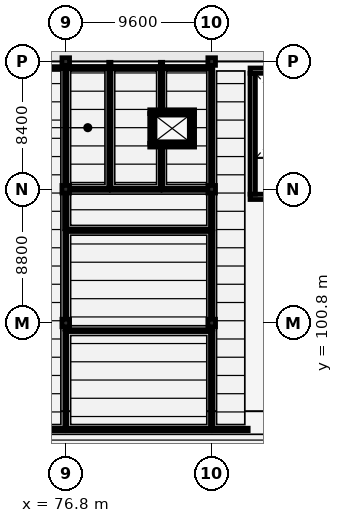
"""IFC4 building model, lengths in metres.
Left out: names, types, materials, properties, quantities, classifications, styles, units other than length and angle.
Written with IfcOpenShell. Run it as: python <this file> out.ifc"""

import sys

from ifc_helpers import new_model, si_unit, direction, frame, frame_2d, origin, origin_2d, place, context, subcontext, project, spatial, rectangle, extrude, element, fill, save


model = new_model("IFC4")
c1 = context("Model", 3, precision=1e-05, world=origin(), true_north=direction((0.0, 1.0)))
c2 = subcontext(c1, "Body", "Model", "MODEL_VIEW")
j1 = project(units=[si_unit("LENGTHUNIT", "METRE"), si_unit("PLANEANGLEUNIT", "RADIAN")], contexts=[c1])
p1 = place(None, origin())
s1 = spatial("IfcSite", under=j1, at=p1, CompositionType="ELEMENT")
p2 = place(p1, origin())
s2 = spatial("IfcBuilding", under=s1, at=p2, CompositionType="ELEMENT")
p3 = place(p2, frame((0.0, 0.0, 14.1)))
s3 = spatial("IfcBuildingStorey", under=s2, at=p3, CompositionType="ELEMENT", Elevation=14.1)
for number, where, z_axis, x_axis in (
    (1, (76.8, 100.8, 0.0), (0.0, 0.0, 1.0), (1.0, 0.0, 0.0)),
    (2, (76.8, 109.6, 0.0), (0.0, 0.0, 1.0), (1.0, 0.0, 0.0)),
):
    element("IfcColumn", number, at=place(p3, frame(where, z_axis=z_axis, x_axis=x_axis)), inside=s3, PredefinedType="COLUMN", context=c2, shape_type="SweptSolid", body=[
        extrude(rectangle(XDim=0.5, YDim=0.5, at=origin_2d()), origin(), (0.0, 0.0, 1.0), 4.5),
    ])
p4 = place(p3, frame((76.8, 118.0, 0.0), z_axis=(0.0, 0.0, 1.0), x_axis=(1.0, 0.0, 0.0)))
e3 = element("IfcColumn", 3, at=p4, inside=s3, PredefinedType="COLUMN", context=c2, shape_type="SweptSolid", body=[
    extrude(rectangle(XDim=0.5, YDim=0.5, at=origin_2d()), origin(), (0.0, 0.0, 1.0), 3.851),
])
p5 = place(p3, frame((86.4, 100.8, 0.0), z_axis=(0.0, 0.0, 1.0), x_axis=(1.0, 0.0, 0.0)))
e4 = element("IfcColumn", 4, at=p5, inside=s3, PredefinedType="COLUMN", context=c2, shape_type="SweptSolid", body=[
    extrude(rectangle(XDim=0.5, YDim=0.5, at=origin_2d()), origin(), (0.0, 0.0, 1.0), 4.5),
])
p6 = place(p3, frame((86.4, 109.6, 0.0), z_axis=(0.0, 0.0, 1.0), x_axis=(1.0, 0.0, 0.0)))
e5 = element("IfcColumn", 5, at=p6, inside=s3, PredefinedType="COLUMN", context=c2, shape_type="SweptSolid", body=[
    extrude(rectangle(XDim=0.5, YDim=0.5, at=origin_2d()), origin(), (0.0, 0.0, 1.0), 4.326),
])
p7 = place(p3, frame((86.4, 118.0, 0.0), z_axis=(0.0, 0.0, 1.0), x_axis=(1.0, 0.0, 0.0)))
e6 = element("IfcColumn", 6, at=p7, inside=s3, PredefinedType="COLUMN", context=c2, shape_type="SweptSolid", body=[
    extrude(rectangle(XDim=0.5, YDim=0.5, at=origin_2d()), origin(), (0.0, 0.0, 1.0), 3.675),
])
for number, where, z_axis, x_axis in (
    (7, (94.575, 109.1, 0.0), (0.0, 0.0, 1.0), (-1.0, 0.0, 0.0)),
    (8, (88.925, 117.4, 0.0), (0.0, 0.0, 1.0), (1.0, 0.0, 0.0)),
):
    element("IfcWall", number, at=place(p3, frame(where, z_axis=z_axis, x_axis=x_axis)), inside=s3, PredefinedType="SHEAR", context=c2, shape_type="SweptSolid", body=[
        extrude(rectangle(XDim=5.65, YDim=0.35, at=frame_2d((2.825, 0.0))), origin(), (0.0, 0.0, 1.0), 3.65),
    ])
p8 = place(p3, frame((89.1, 109.275, 0.0), z_axis=(0.0, 0.0, 1.0), x_axis=(0.0, 1.0, 0.0)))
e9 = element("IfcWall", 9, at=p8, inside=s3, PredefinedType="SHEAR", context=c2, shape_type="SweptSolid", body=[
    extrude(rectangle(XDim=7.95, YDim=0.35, at=frame_2d((3.975, 0.0))), origin(), (0.0, 0.0, 1.0), 3.65),
])
p9 = place(p8, frame((0.22, 0.0, 0.0)))
e10 = element("IfcOpeningElement", 10, at=p9, cuts=e9, PredefinedType="OPENING", context=c2, shape_type="SweptSolid", body=[
    extrude(rectangle(XDim=2.05, YDim=2.15, at=frame_2d((1.025, 1.075))), frame((0.0, 0.185, 0.0), z_axis=(0.0, -1.0, 0.0), x_axis=(1.0, 0.0, 0.0)), (0.0, 0.0, 1.0), 0.37),
])
p10 = place(p3, frame((85.275, 112.5, 0.0), z_axis=(0.0, 0.0, 1.0), x_axis=(-1.0, 0.0, 0.0)))
e11 = element("IfcWall", 11, at=p10, inside=s3, PredefinedType="SOLIDWALL", context=c2, shape_type="SweptSolid", body=[
    extrude(rectangle(XDim=2.95, YDim=0.25, at=frame_2d((1.475, 0.0))), origin(), (0.0, 0.0, 1.0), 3.65),
])
p11 = place(p10, frame((0.925, 0.0, 0.0)))
e12 = element("IfcOpeningElement", 12, at=p11, cuts=e11, PredefinedType="OPENING", context=c2, shape_type="SweptSolid", body=[
    extrude(rectangle(XDim=1.1, YDim=2.15, at=frame_2d((0.55, 1.075))), frame((0.0, 0.135, 0.0), z_axis=(0.0, -1.0, 0.0), x_axis=(1.0, 0.0, 0.0)), (0.0, 0.0, 1.0), 0.27),
])
p12 = place(p3, frame((82.325, 114.7, 0.0), z_axis=(0.0, 0.0, 1.0), x_axis=(1.0, 0.0, 0.0)))
e13 = element("IfcWall", 13, at=p12, inside=s3, PredefinedType="SOLIDWALL", context=c2, shape_type="SweptSolid", body=[
    extrude(rectangle(XDim=2.95, YDim=0.25, at=frame_2d((1.475, 0.0))), origin(), (0.0, 0.0, 1.0), 3.65),
])
for number, where, z_axis, x_axis in (
    (14, (82.45, 112.625, 0.0), (0.0, 0.0, 1.0), (0.0, 1.0, 0.0)),
    (15, (85.15, 114.575, 0.0), (0.0, 0.0, 1.0), (0.0, -1.0, 0.0)),
):
    element("IfcWall", number, at=place(p3, frame(where, z_axis=z_axis, x_axis=x_axis)), inside=s3, PredefinedType="SOLIDWALL", context=c2, shape_type="SweptSolid", body=[
        extrude(rectangle(XDim=1.95, YDim=0.25, at=frame_2d((0.975, 0.0))), origin(), (0.0, 0.0, 1.0), 3.65),
    ])
p13 = place(p3, frame((86.5, 93.8, 0.0), z_axis=(0.0, 0.0, 1.0), x_axis=(1.0, 0.0, 0.0)))
e16 = element("IfcWall", 16, at=p13, inside=s3, PredefinedType="PARTITIONING", context=c2, shape_type="SweptSolid", body=[
    extrude(rectangle(XDim=2.3, YDim=0.16, at=frame_2d((1.15, 0.0))), origin(), (0.0, 0.0, 1.0), 3.1),
])
p14 = place(p13, frame((0.25, 0.0, 0.0)))
e17 = element("IfcOpeningElement", 17, at=p14, cuts=e16, PredefinedType="OPENING", context=c2, shape_type="SweptSolid", body=[
    extrude(rectangle(XDim=1.8, YDim=2.15, at=frame_2d((0.9, 1.075))), frame((0.0, 0.09, 0.0), z_axis=(0.0, -1.0, 0.0), x_axis=(1.0, 0.0, 0.0)), (0.0, 0.0, 1.0), 0.18),
])
p15 = place(p3, frame((48.05, 93.8, 0.0), z_axis=(0.0, 0.0, 1.0), x_axis=(1.0, 0.0, 0.0)))
e18 = element("IfcWall", 18, at=p15, inside=s3, PredefinedType="PARTITIONING", context=c2, shape_type="SweptSolid", body=[
    extrude(rectangle(XDim=28.65, YDim=0.16, at=frame_2d((14.325, 0.0))), origin(), (0.0, 0.0, 1.0), 3.1),
])
p16 = place(p15, frame((13.85, 0.0, 0.0)))
e19 = element("IfcOpeningElement", 19, at=p16, cuts=e18, PredefinedType="OPENING", context=c2, shape_type="SweptSolid", body=[
    extrude(rectangle(XDim=0.95, YDim=2.15, at=frame_2d((0.475, 1.075))), frame((0.0, 0.09, 0.0), z_axis=(0.0, -1.0, 0.0), x_axis=(1.0, 0.0, 0.0)), (0.0, 0.0, 1.0), 0.18),
])
p17 = place(p3, frame((76.9, 93.8, 0.0), z_axis=(0.0, 0.0, 1.0), x_axis=(1.0, 0.0, 0.0)))
e20 = element("IfcWall", 20, at=p17, inside=s3, PredefinedType="PARTITIONING", context=c2, shape_type="SweptSolid", body=[
    extrude(rectangle(XDim=9.4, YDim=0.16, at=frame_2d((4.7, 0.0))), origin(), (0.0, 0.0, 1.0), 3.1),
])
p18 = place(p17, frame((4.18, 0.0, 0.0)))
e21 = element("IfcOpeningElement", 21, at=p18, cuts=e20, PredefinedType="OPENING", context=c2, shape_type="SweptSolid", body=[
    extrude(rectangle(XDim=1.04, YDim=2.18, at=frame_2d((0.52, 1.09))), frame((0.0, 0.09, 0.0), z_axis=(0.0, -1.0, 0.0), x_axis=(1.0, 0.0, 0.0)), (0.0, 0.0, 1.0), 0.18),
])
p19 = place(p3, frame((86.4, 100.4, 0.0), z_axis=(0.0, 0.0, 1.0), x_axis=(0.0, 1.0, 0.0)))
e22 = element("IfcWall", 22, at=p19, inside=s3, PredefinedType="PARTITIONING", context=c2, shape_type="SweptSolid", body=[
    extrude(rectangle(XDim=6.4, YDim=0.16, at=frame_2d((3.2, 0.0))), origin(), (0.0, 0.0, 1.0), 3.1),
])
p20 = place(p19, frame((2.68, 0.0, 0.0)))
e23 = element("IfcOpeningElement", 23, at=p20, cuts=e22, PredefinedType="OPENING", context=c2, shape_type="SweptSolid", body=[
    extrude(rectangle(XDim=1.04, YDim=2.18, at=frame_2d((0.52, 1.09))), frame((0.0, 0.09, 0.0), z_axis=(0.0, -1.0, 0.0), x_axis=(1.0, 0.0, 0.0)), (0.0, 0.0, 1.0), 0.18),
])
p21 = place(p3, frame((86.4, 107.0, 0.0), z_axis=(0.0, 0.0, 1.0), x_axis=(0.0, 1.0, 0.0)))
e24 = element("IfcWall", 24, at=p21, inside=s3, PredefinedType="PARTITIONING", context=c2, shape_type="SweptSolid", body=[
    extrude(rectangle(XDim=2.5, YDim=0.16, at=frame_2d((1.25, 0.0))), origin(), (0.0, 0.0, 1.0), 3.1),
])
p22 = place(p21, frame((0.22, 0.0, 0.0)))
e25 = element("IfcOpeningElement", 25, at=p22, cuts=e24, PredefinedType="OPENING", context=c2, shape_type="SweptSolid", body=[
    extrude(rectangle(XDim=1.8, YDim=2.15, at=frame_2d((0.9, 1.075))), frame((0.0, 0.09, 0.0), z_axis=(0.0, -1.0, 0.0), x_axis=(1.0, 0.0, 0.0)), (0.0, 0.0, 1.0), 0.18),
])
p23 = place(p3, frame((86.4, 109.7, 0.0), z_axis=(0.0, 0.0, 1.0), x_axis=(0.0, 1.0, 0.0)))
e26 = element("IfcWall", 26, at=p23, inside=s3, PredefinedType="PARTITIONING", context=c2, shape_type="SweptSolid", body=[
    extrude(rectangle(XDim=8.25, YDim=0.15, at=frame_2d((4.125, 0.0))), origin(), (0.0, 0.0, 1.0), 2.816),
])
p24 = place(p23, frame((3.675, 0.0, 0.0)))
e27 = element("IfcOpeningElement", 27, at=p24, cuts=e26, PredefinedType="OPENING", context=c2, shape_type="SweptSolid", body=[
    extrude(rectangle(XDim=0.9, YDim=2.15, at=frame_2d((0.45, 1.075))), frame((0.0, 0.085, 0.0), z_axis=(0.0, -1.0, 0.0), x_axis=(1.0, 0.0, 0.0)), (0.0, 0.0, 1.0), 0.17),
])
p25 = place(p3, frame((86.4, 93.9, 0.0), z_axis=(0.0, 0.0, 1.0), x_axis=(0.0, 1.0, 0.0)))
e28 = element("IfcWall", 28, at=p25, inside=s3, PredefinedType="PARTITIONING", context=c2, shape_type="SweptSolid", body=[
    extrude(rectangle(XDim=6.3, YDim=0.16, at=frame_2d((3.15, 0.0))), origin(), (0.0, 0.0, 1.0), 3.1),
])
p26 = place(p25, frame((2.63, 0.0, 0.0)))
e29 = element("IfcOpeningElement", 29, at=p26, cuts=e28, PredefinedType="OPENING", context=c2, shape_type="SweptSolid", body=[
    extrude(rectangle(XDim=1.04, YDim=2.18, at=frame_2d((0.52, 1.09))), frame((0.0, 0.09, 0.0), z_axis=(0.0, -1.0, 0.0), x_axis=(1.0, 0.0, 0.0)), (0.0, 0.0, 1.0), 0.18),
])
p27 = place(p3, frame((76.8, 100.4, 0.0), z_axis=(0.0, 0.0, 1.0), x_axis=(0.0, 1.0, 0.0)))
e30 = element("IfcWall", 30, at=p27, inside=s3, PredefinedType="PARTITIONING", context=c2, shape_type="SweptSolid", body=[
    extrude(rectangle(XDim=6.4, YDim=0.125, at=frame_2d((3.2, 0.0))), origin(), (0.0, 0.0, 1.0), 3.1),
])
p28 = place(p3, frame((76.8, 107.0, 0.0), z_axis=(0.0, 0.0, 1.0), x_axis=(0.0, 1.0, 0.0)))
e31 = element("IfcWall", 31, at=p28, inside=s3, PredefinedType="PARTITIONING", context=c2, shape_type="SweptSolid", body=[
    extrude(rectangle(XDim=2.5, YDim=0.16, at=frame_2d((1.25, 0.0))), origin(), (0.0, 0.0, 1.0), 3.1),
])
p29 = place(p28, frame((0.443, 0.0, 0.0)))
e32 = element("IfcOpeningElement", 32, at=p29, cuts=e31, PredefinedType="OPENING", context=c2, shape_type="SweptSolid", body=[
    extrude(rectangle(XDim=0.95, YDim=2.15, at=frame_2d((0.475, 1.075))), frame((0.0, 0.09, 0.0), z_axis=(0.0, -1.0, 0.0), x_axis=(1.0, 0.0, 0.0)), (0.0, 0.0, 1.0), 0.18),
])
p30 = place(p3, frame((76.8, 109.7, 0.0), z_axis=(0.0, 0.0, 1.0), x_axis=(0.0, 1.0, 0.0)))
e33 = element("IfcWall", 33, at=p30, inside=s3, PredefinedType="PARTITIONING", context=c2, shape_type="SweptSolid", body=[
    extrude(rectangle(XDim=8.25, YDim=0.15, at=frame_2d((4.125, 0.0))), origin(), (0.0, 0.0, 1.0), 2.992),
])
p31 = place(p3, frame((76.8, 93.9, 0.0), z_axis=(0.0, 0.0, 1.0), x_axis=(0.0, 1.0, 0.0)))
e34 = element("IfcWall", 34, at=p31, inside=s3, PredefinedType="PARTITIONING", context=c2, shape_type="SweptSolid", body=[
    extrude(rectangle(XDim=6.3, YDim=0.125, at=frame_2d((3.15, 0.0))), origin(), (0.0, 0.0, 1.0), 3.1),
])
p32 = place(p3, frame((76.9, 106.9, 0.0), z_axis=(0.0, 0.0, 1.0), x_axis=(1.0, 0.0, 0.0)))
e35 = element("IfcWall", 35, at=p32, inside=s3, PredefinedType="PARTITIONING", context=c2, shape_type="SweptSolid", body=[
    extrude(rectangle(XDim=9.4, YDim=0.16, at=frame_2d((4.7, 0.0))), origin(), (0.0, 0.0, 1.0), 3.1),
])
p33 = place(p32, frame((4.18, 0.0, 0.0)))
e36 = element("IfcOpeningElement", 36, at=p33, cuts=e35, PredefinedType="OPENING", context=c2, shape_type="SweptSolid", body=[
    extrude(rectangle(XDim=1.04, YDim=2.18, at=frame_2d((0.52, 1.09))), frame((0.0, 0.09, 0.0), z_axis=(0.0, -1.0, 0.0), x_axis=(1.0, 0.0, 0.0)), (0.0, 0.0, 1.0), 0.18),
])
p34 = place(p3, frame((76.9, 100.3, 0.0), z_axis=(0.0, 0.0, 1.0), x_axis=(1.0, 0.0, 0.0)))
e37 = element("IfcWall", 37, at=p34, inside=s3, PredefinedType="PARTITIONING", context=c2, shape_type="SweptSolid", body=[
    extrude(rectangle(XDim=9.4, YDim=0.125, at=frame_2d((4.7, 0.0))), origin(), (0.0, 0.0, 1.0), 3.1),
])
p35 = place(p3, frame((76.9, 109.6, 0.0), z_axis=(0.0, 0.0, 1.0), x_axis=(1.0, 0.0, 0.0)))
e38 = element("IfcWall", 38, at=p35, inside=s3, PredefinedType="PARTITIONING", context=c2, shape_type="SweptSolid", body=[
    extrude(rectangle(XDim=2.7, YDim=0.15, at=frame_2d((1.35, 0.0))), origin(), (0.0, 0.0, 1.0), 3.1),
])
p36 = place(p35, frame((1.132, 0.0, 0.0)))
e39 = element("IfcOpeningElement", 39, at=p36, cuts=e38, PredefinedType="OPENING", context=c2, shape_type="SweptSolid", body=[
    extrude(rectangle(XDim=0.95, YDim=2.15, at=frame_2d((0.475, 1.075))), frame((0.0, 0.085, 0.0), z_axis=(0.0, -1.0, 0.0), x_axis=(1.0, 0.0, 0.0)), (0.0, 0.0, 1.0), 0.17),
])
p37 = place(p3, frame((79.8, 109.6, 0.0), z_axis=(0.0, 0.0, 1.0), x_axis=(1.0, 0.0, 0.0)))
e40 = element("IfcWall", 40, at=p37, inside=s3, PredefinedType="PARTITIONING", context=c2, shape_type="SweptSolid", body=[
    extrude(rectangle(XDim=3.2, YDim=0.15, at=frame_2d((1.6, 0.0))), origin(), (0.0, 0.0, 1.0), 3.1),
])
p38 = place(p37, frame((1.15, 0.0, 0.0)))
e41 = element("IfcOpeningElement", 41, at=p38, cuts=e40, PredefinedType="OPENING", context=c2, shape_type="SweptSolid", body=[
    extrude(rectangle(XDim=0.9, YDim=2.15, at=frame_2d((0.45, 1.075))), frame((0.0, 0.085, 0.0), z_axis=(0.0, -1.0, 0.0), x_axis=(1.0, 0.0, 0.0)), (0.0, 0.0, 1.0), 0.17),
])
p39 = place(p3, frame((83.2, 109.6, 0.0), z_axis=(0.0, 0.0, 1.0), x_axis=(1.0, 0.0, 0.0)))
e42 = element("IfcWall", 42, at=p39, inside=s3, PredefinedType="PARTITIONING", context=c2, shape_type="SweptSolid", body=[
    extrude(rectangle(XDim=3.1, YDim=0.15, at=frame_2d((1.55, 0.0))), origin(), (0.0, 0.0, 1.0), 3.1),
])
p40 = place(p39, frame((1.1, 0.0, 0.0)))
e43 = element("IfcOpeningElement", 43, at=p40, cuts=e42, PredefinedType="OPENING", context=c2, shape_type="SweptSolid", body=[
    extrude(rectangle(XDim=0.9, YDim=2.15, at=frame_2d((0.45, 1.075))), frame((0.0, 0.085, 0.0), z_axis=(0.0, -1.0, 0.0), x_axis=(1.0, 0.0, 0.0)), (0.0, 0.0, 1.0), 0.17),
])
for number, where, z_axis, x_axis in (
    (44, (79.7, 109.7, 0.0), (0.0, 0.0, 1.0), (0.0, 1.0, 0.0)),
    (45, (83.1, 109.7, 0.0), (0.0, 0.0, 1.0), (0.0, 1.0, 0.0)),
):
    element("IfcWall", number, at=place(p3, frame(where, z_axis=z_axis, x_axis=x_axis)), inside=s3, PredefinedType="PARTITIONING", context=c2, shape_type="SweptSolid", body=[
        extrude(rectangle(XDim=8.25, YDim=0.15, at=frame_2d((4.125, 0.0))), origin(), (0.0, 0.0, 1.0), 3.1),
    ])
p41 = place(p3, frame((48.05, 117.6, 0.0), z_axis=(0.0, 0.0, 1.0), x_axis=(1.0, 0.0, 0.0)))
e46 = element("IfcWall", 46, at=p41, inside=s3, PredefinedType="PARTITIONING", context=c2, shape_type="SweptSolid", body=[
    extrude(rectangle(XDim=28.51, YDim=0.125, at=frame_2d((14.255, 0.0))), origin(), (0.0, 0.0, 1.0), 3.1),
])
p42 = place(p3, frame((77.04, 117.6, 0.0), z_axis=(0.0, 0.0, 1.0), x_axis=(1.0, 0.0, 0.0)))
e47 = element("IfcWall", 47, at=p42, inside=s3, PredefinedType="PARTITIONING", context=c2, shape_type="SweptSolid", body=[
    extrude(rectangle(XDim=2.42, YDim=0.15, at=frame_2d((1.21, 0.0))), origin(), (0.0, 0.0, 1.0), 3.1),
])
p43 = place(p3, frame((79.94, 117.6, 0.0), z_axis=(0.0, 0.0, 1.0), x_axis=(1.0, 0.0, 0.0)))
e48 = element("IfcWall", 48, at=p43, inside=s3, PredefinedType="PARTITIONING", context=c2, shape_type="SweptSolid", body=[
    extrude(rectangle(XDim=2.92, YDim=0.15, at=frame_2d((1.46, 0.0))), origin(), (0.0, 0.0, 1.0), 3.1),
])
p44 = place(p3, frame((83.34, 117.6, 0.0), z_axis=(0.0, 0.0, 1.0), x_axis=(1.0, 0.0, 0.0)))
e49 = element("IfcWall", 49, at=p44, inside=s3, PredefinedType="PARTITIONING", context=c2, shape_type="SweptSolid", body=[
    extrude(rectangle(XDim=2.82, YDim=0.15, at=frame_2d((1.41, 0.0))), origin(), (0.0, 0.0, 1.0), 3.1),
])
p45 = place(p9, origin())
e50 = element("IfcDoor", 50, at=p45, inside=s3, OperationType="DOUBLE_DOOR_SINGLE_SWING", PredefinedType="DOOR", context=c2, shape_type="SweptSolid", body=[
    extrude(rectangle(XDim=2.05, YDim=2.15, at=frame_2d((1.025, 1.075))), frame((0.0, 0.025, 0.0), z_axis=(0.0, -1.0, 0.0), x_axis=(1.0, 0.0, 0.0)), (0.0, 0.0, 1.0), 0.05),
])
fill(e10, e50)
p46 = place(p11, origin())
e51 = element("IfcDoor", 51, at=p46, inside=s3, OperationType="DOUBLE_DOOR_SLIDING", PredefinedType="DOOR", context=c2, shape_type="SweptSolid", body=[
    extrude(rectangle(XDim=1.1, YDim=2.15, at=frame_2d((0.55, 1.075))), frame((0.0, 0.025, 0.0), z_axis=(0.0, -1.0, 0.0), x_axis=(1.0, 0.0, 0.0)), (0.0, 0.0, 1.0), 0.05),
])
fill(e12, e51)
p47 = place(p14, origin())
e52 = element("IfcDoor", 52, at=p47, inside=s3, OperationType="DOUBLE_DOOR_SINGLE_SWING", PredefinedType="DOOR", context=c2, shape_type="SweptSolid", body=[
    extrude(rectangle(XDim=1.8, YDim=2.15, at=frame_2d((0.9, 1.075))), frame((0.0, 0.025, 0.0), z_axis=(0.0, -1.0, 0.0), x_axis=(1.0, 0.0, 0.0)), (0.0, 0.0, 1.0), 0.05),
])
fill(e17, e52)
p48 = place(p18, origin())
e53 = element("IfcDoor", 53, at=p48, inside=s3, OperationType="SINGLE_SWING_LEFT", PredefinedType="DOOR", context=c2, shape_type="SweptSolid", body=[
    extrude(rectangle(XDim=1.04, YDim=2.18, at=frame_2d((0.52, 1.09))), frame((0.0, 0.025, 0.0), z_axis=(0.0, -1.0, 0.0), x_axis=(1.0, 0.0, 0.0)), (0.0, 0.0, 1.0), 0.05),
])
fill(e21, e53)
p49 = place(p20, origin())
e54 = element("IfcDoor", 54, at=p49, inside=s3, OperationType="SINGLE_SWING_RIGHT", PredefinedType="DOOR", context=c2, shape_type="SweptSolid", body=[
    extrude(rectangle(XDim=1.04, YDim=2.18, at=frame_2d((0.52, 1.09))), frame((0.0, 0.025, 0.0), z_axis=(0.0, -1.0, 0.0), x_axis=(1.0, 0.0, 0.0)), (0.0, 0.0, 1.0), 0.05),
])
fill(e23, e54)
p50 = place(p22, origin())
e55 = element("IfcDoor", 55, at=p50, inside=s3, OperationType="DOUBLE_DOOR_SINGLE_SWING", PredefinedType="DOOR", context=c2, shape_type="SweptSolid", body=[
    extrude(rectangle(XDim=1.8, YDim=2.15, at=frame_2d((0.9, 1.075))), frame((0.0, 0.025, 0.0), z_axis=(0.0, -1.0, 0.0), x_axis=(1.0, 0.0, 0.0)), (0.0, 0.0, 1.0), 0.05),
])
fill(e25, e55)
p51 = place(p24, origin())
e56 = element("IfcDoor", 56, at=p51, inside=s3, OperationType="SINGLE_SWING_RIGHT", PredefinedType="DOOR", context=c2, shape_type="SweptSolid", body=[
    extrude(rectangle(XDim=0.9, YDim=2.15, at=frame_2d((0.45, 1.075))), frame((0.0, 0.025, 0.0), z_axis=(0.0, -1.0, 0.0), x_axis=(1.0, 0.0, 0.0)), (0.0, 0.0, 1.0), 0.05),
])
fill(e27, e56)
p52 = place(p26, origin())
e57 = element("IfcDoor", 57, at=p52, inside=s3, OperationType="SINGLE_SWING_LEFT", PredefinedType="DOOR", context=c2, shape_type="SweptSolid", body=[
    extrude(rectangle(XDim=1.04, YDim=2.18, at=frame_2d((0.52, 1.09))), frame((0.0, 0.025, 0.0), z_axis=(0.0, -1.0, 0.0), x_axis=(1.0, 0.0, 0.0)), (0.0, 0.0, 1.0), 0.05),
])
fill(e29, e57)
p53 = place(p29, origin())
e58 = element("IfcDoor", 58, at=p53, inside=s3, OperationType="SINGLE_SWING_RIGHT", PredefinedType="DOOR", context=c2, shape_type="SweptSolid", body=[
    extrude(rectangle(XDim=0.95, YDim=2.15, at=frame_2d((0.475, 1.075))), frame((0.0, 0.025, 0.0), z_axis=(0.0, -1.0, 0.0), x_axis=(1.0, 0.0, 0.0)), (0.0, 0.0, 1.0), 0.05),
])
fill(e32, e58)
p54 = place(p33, origin())
e59 = element("IfcDoor", 59, at=p54, inside=s3, OperationType="SINGLE_SWING_LEFT", PredefinedType="DOOR", context=c2, shape_type="SweptSolid", body=[
    extrude(rectangle(XDim=1.04, YDim=2.18, at=frame_2d((0.52, 1.09))), frame((0.0, 0.025, 0.0), z_axis=(0.0, -1.0, 0.0), x_axis=(1.0, 0.0, 0.0)), (0.0, 0.0, 1.0), 0.05),
])
fill(e36, e59)
p55 = place(p36, origin())
e60 = element("IfcDoor", 60, at=p55, inside=s3, OperationType="SINGLE_SWING_RIGHT", PredefinedType="DOOR", context=c2, shape_type="SweptSolid", body=[
    extrude(rectangle(XDim=0.95, YDim=2.15, at=frame_2d((0.475, 1.075))), frame((0.0, 0.025, 0.0), z_axis=(0.0, -1.0, 0.0), x_axis=(1.0, 0.0, 0.0)), (0.0, 0.0, 1.0), 0.05),
])
fill(e39, e60)
p56 = place(p38, origin())
e61 = element("IfcDoor", 61, at=p56, inside=s3, OperationType="SINGLE_SWING_LEFT", PredefinedType="DOOR", context=c2, shape_type="SweptSolid", body=[
    extrude(rectangle(XDim=0.9, YDim=2.15, at=frame_2d((0.45, 1.075))), frame((0.0, 0.025, 0.0), z_axis=(0.0, -1.0, 0.0), x_axis=(1.0, 0.0, 0.0)), (0.0, 0.0, 1.0), 0.05),
])
fill(e41, e61)
p57 = place(p40, origin())
e62 = element("IfcDoor", 62, at=p57, inside=s3, OperationType="SINGLE_SWING_RIGHT", PredefinedType="DOOR", context=c2, shape_type="SweptSolid", body=[
    extrude(rectangle(XDim=0.9, YDim=2.15, at=frame_2d((0.45, 1.075))), frame((0.0, 0.025, 0.0), z_axis=(0.0, -1.0, 0.0), x_axis=(1.0, 0.0, 0.0)), (0.0, 0.0, 1.0), 0.05),
])
fill(e43, e62)
save(model, sys.argv[1])
